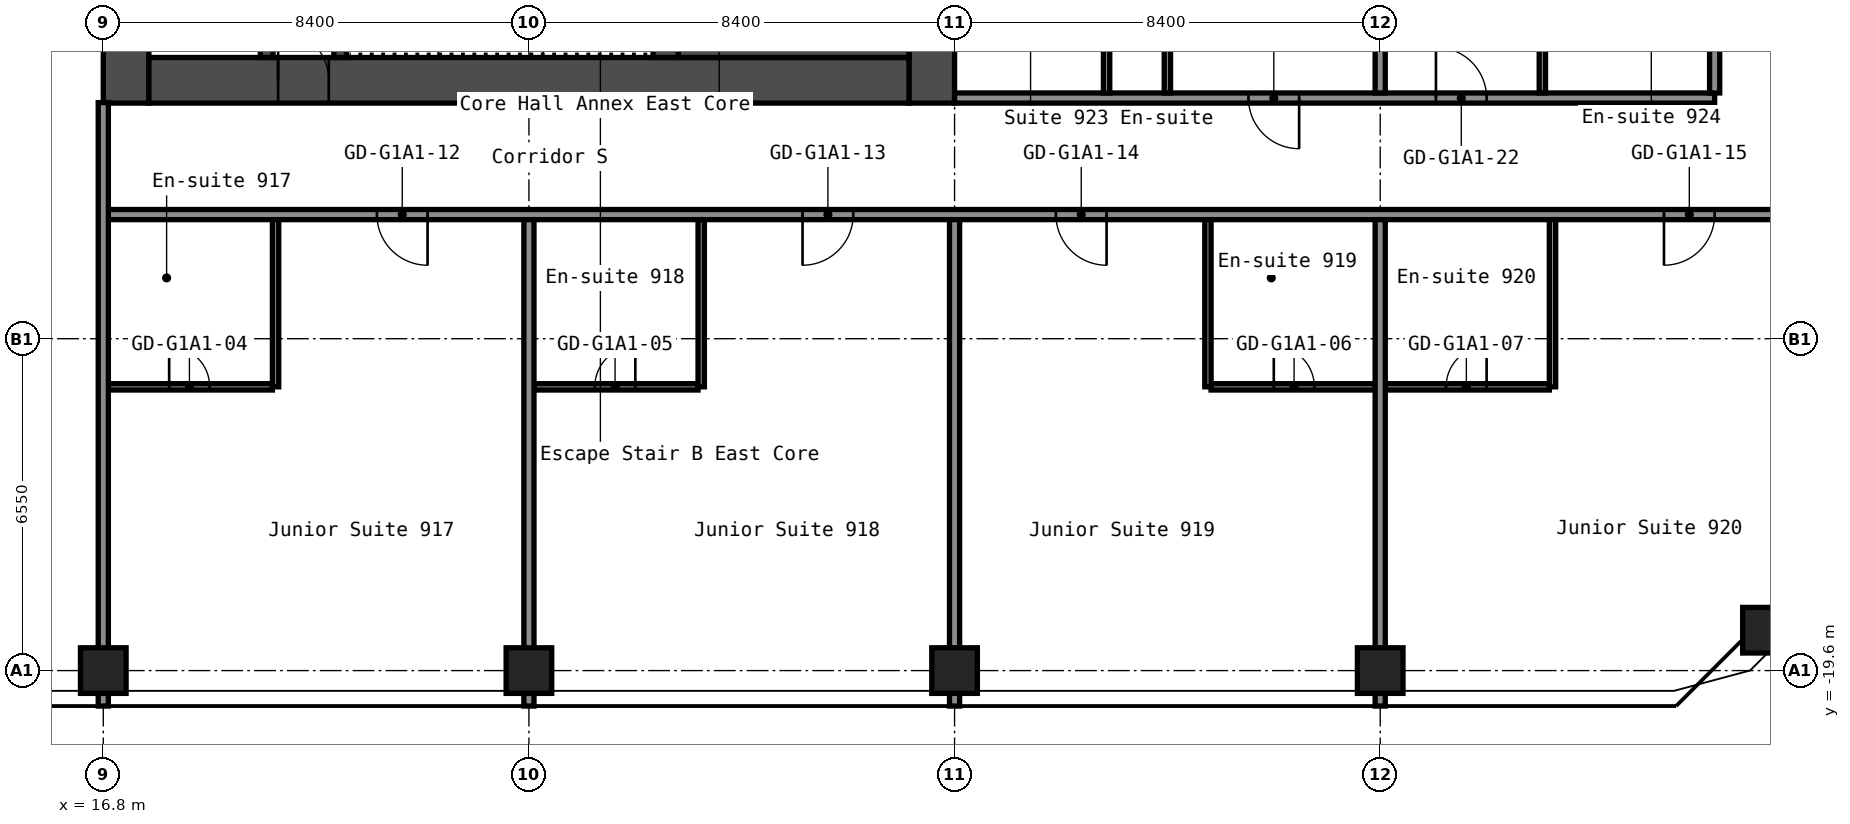
"""IFC4 building model, lengths in metres.
Left out: names, types, materials, properties, quantities, classifications, styles, units other than length and angle.
Written with IfcOpenShell. Run it as: python <this file> out.ifc"""

import sys

from ifc_helpers import new_model, si_unit, direction, frame, frame_2d, origin, origin_2d, place, context, subcontext, project, spatial, rectangle, hollow_rectangle, extrude, element, fill, save


model = new_model("IFC4")
c1 = context("Model", 3, precision=1e-05, world=origin(), true_north=direction((0.0, 1.0)))
c2 = subcontext(c1, "Body", "Model", "MODEL_VIEW")
j1 = project(units=[si_unit("LENGTHUNIT", "METRE"), si_unit("PLANEANGLEUNIT", "RADIAN")], contexts=[c1])
p1 = place(None, origin())
s1 = spatial("IfcSite", under=j1, at=p1, CompositionType="ELEMENT")
p2 = place(p1, origin())
s2 = spatial("IfcBuilding", under=s1, at=p2, CompositionType="ELEMENT")
p3 = place(p2, frame((0.0, 0.0, 35.8)))
s3 = spatial("IfcBuildingStorey", under=s2, at=p3, CompositionType="ELEMENT", Elevation=35.8)
for number, where, z_axis, x_axis in (
    (1, (16.8, -19.6, 0.0), (0.0, 0.0, 1.0), (1.0, 0.0, 0.0)),
    (2, (25.2, -19.6, 0.0), (0.0, 0.0, 1.0), (1.0, 0.0, 0.0)),
    (3, (33.6, -19.6, 0.0), (0.0, 0.0, 1.0), (1.0, 0.0, 0.0)),
    (4, (42.0, -19.6, 0.0), (0.0, 0.0, 1.0), (1.0, 0.0, 0.0)),
    (5, (49.603, -18.803, 0.0), (0.0, 0.0, 1.0), (1.0, 0.0, 0.0)),
):
    element("IfcColumn", number, at=place(p3, frame(where, z_axis=z_axis, x_axis=x_axis)), inside=s3, PredefinedType="COLUMN", context=c2, shape_type="SweptSolid", body=[
        extrude(hollow_rectangle(XDim=0.9, YDim=0.9, WallThickness=0.036, at=origin_2d()), origin(), (0.0, 0.0, 1.0), 2.8),
    ])
p4 = place(p3, frame((17.25, -8.4, 0.0), z_axis=(0.0, 0.0, 1.0), x_axis=(0.0, 1.0, 0.0)))
e6 = element("IfcWall", 6, at=p4, inside=s3, PredefinedType="SHEAR", context=c2, shape_type="SweptSolid", body=[
    extrude(rectangle(XDim=16.8, YDim=0.9, at=frame_2d((8.4, 0.0))), origin(), (0.0, 0.0, 1.0), 2.8),
])
p5 = place(p4, frame((12.75, 0.0, 0.0)))
e7 = element("IfcOpeningElement", 7, at=p5, cuts=e6, PredefinedType="OPENING", context=c2, shape_type="SweptSolid", body=[
    extrude(rectangle(XDim=1.2, YDim=2.1, at=frame_2d((0.6, 1.05))), frame((0.0, 0.46, 0.0), z_axis=(0.0, -1.0, 0.0), x_axis=(1.0, 0.0, 0.0)), (0.0, 0.0, 1.0), 0.92),
])
p6 = place(p4, frame((2.85, 0.0, 0.0)))
e8 = element("IfcOpeningElement", 8, at=p6, cuts=e6, PredefinedType="OPENING", context=c2, shape_type="SweptSolid", body=[
    extrude(rectangle(XDim=1.2, YDim=2.1, at=frame_2d((0.6, 1.05))), frame((0.0, 0.46, 0.0), z_axis=(0.0, -1.0, 0.0), x_axis=(1.0, 0.0, 0.0)), (0.0, 0.0, 1.0), 0.92),
])
p7 = place(p3, frame((33.15, -8.4, 0.0), z_axis=(0.0, 0.0, 1.0), x_axis=(0.0, 1.0, 0.0)))
e9 = element("IfcWall", 9, at=p7, inside=s3, PredefinedType="SHEAR", context=c2, shape_type="SweptSolid", body=[
    extrude(rectangle(XDim=16.8, YDim=0.9, at=frame_2d((8.4, 0.0))), origin(), (0.0, 0.0, 1.0), 2.8),
])
p8 = place(p3, frame((17.7, -7.95, 0.0), z_axis=(0.0, 0.0, 1.0), x_axis=(1.0, 0.0, 0.0)))
e10 = element("IfcWall", 10, at=p8, inside=s3, PredefinedType="SHEAR", context=c2, shape_type="SweptSolid", body=[
    extrude(rectangle(XDim=15.0, YDim=0.9, at=frame_2d((7.5, 0.0))), origin(), (0.0, 0.0, 1.0), 2.8),
])
p9 = place(p8, frame((2.55, 0.0, 0.0)))
e11 = element("IfcOpeningElement", 11, at=p9, cuts=e10, PredefinedType="OPENING", context=c2, shape_type="SweptSolid", body=[
    extrude(rectangle(XDim=1.0, YDim=2.1, at=frame_2d((0.5, 1.05))), frame((0.0, 0.46, 0.0), z_axis=(0.0, -1.0, 0.0), x_axis=(1.0, 0.0, 0.0)), (0.0, 0.0, 1.0), 0.92),
])
p10 = place(p3, frame((20.025, -7.5, 0.0), z_axis=(0.0, 0.0, 1.0), x_axis=(0.0, 1.0, 0.0)))
e12 = element("IfcWall", 12, at=p10, inside=s3, PredefinedType="SHEAR", context=c2, shape_type="SweptSolid", body=[
    extrude(rectangle(XDim=6.3, YDim=0.25, at=frame_2d((3.15, 0.0))), origin(), (0.0, 0.0, 1.0), 2.8),
])
p11 = place(p10, frame((2.4, 0.0, 0.0)))
e13 = element("IfcOpeningElement", 13, at=p11, cuts=e12, PredefinedType="OPENING", context=c2, shape_type="SweptSolid", body=[
    extrude(rectangle(XDim=1.0, YDim=2.1, at=frame_2d((0.5, 1.05))), frame((0.0, 0.135, 0.0), z_axis=(0.0, -1.0, 0.0), x_axis=(1.0, 0.0, 0.0)), (0.0, 0.0, 1.0), 0.27),
])
p12 = place(p3, frame((21.475, -7.5, 0.0), z_axis=(0.0, 0.0, 1.0), x_axis=(0.0, 1.0, 0.0)))
e14 = element("IfcWall", 14, at=p12, inside=s3, PredefinedType="SHEAR", context=c2, shape_type="SweptSolid", body=[
    extrude(rectangle(XDim=3.75, YDim=0.25, at=frame_2d((1.875, 0.0))), origin(), (0.0, 0.0, 1.0), 2.8),
])
p13 = place(p12, frame((1.3, 0.0, 0.0)))
e15 = element("IfcOpeningElement", 15, at=p13, cuts=e14, PredefinedType="OPENING", context=c2, shape_type="SweptSolid", body=[
    extrude(rectangle(XDim=1.2, YDim=2.1, at=frame_2d((0.6, 1.05))), frame((0.0, 0.135, 0.0), z_axis=(0.0, -1.0, 0.0), x_axis=(1.0, 0.0, 0.0)), (0.0, 0.0, 1.0), 0.27),
])
p14 = place(p3, frame((27.9, -7.5, 0.0), z_axis=(0.0, 0.0, 1.0), x_axis=(0.0, 1.0, 0.0)))
e16 = element("IfcWall", 16, at=p14, inside=s3, PredefinedType="SHEAR", context=c2, shape_type="SweptSolid", body=[
    extrude(rectangle(XDim=3.75, YDim=0.5, at=frame_2d((1.875, 0.0))), origin(), (0.0, 0.0, 1.0), 2.8),
])
p15 = place(p3, frame((28.15, -6.75, 0.0), z_axis=(0.0, 0.0, 1.0), x_axis=(1.0, 0.0, 0.0)))
e17 = element("IfcWall", 17, at=p15, inside=s3, PredefinedType="SHEAR", context=c2, shape_type="SweptSolid", body=[
    extrude(rectangle(XDim=4.55, YDim=1.5, at=frame_2d((2.275, 0.0))), origin(), (0.0, 0.0, 1.0), 2.8),
])
p16 = place(p3, frame((16.9, -14.0, 0.0), z_axis=(0.0, 0.0, 1.0), x_axis=(1.0, 0.0, 0.0)))
e18 = element("IfcWall", 18, at=p16, inside=s3, PredefinedType="PARTITIONING", context=c2, shape_type="SweptSolid", body=[
    extrude(rectangle(XDim=3.238, YDim=0.125, at=frame_2d((1.619, 0.0))), origin(), (0.0, 0.0, 1.0), 2.8),
])
p17 = place(p16, frame((1.2, 0.0, 0.0)))
e19 = element("IfcOpeningElement", 19, at=p17, cuts=e18, PredefinedType="OPENING", context=c2, shape_type="SweptSolid", body=[
    extrude(rectangle(XDim=0.8, YDim=2.1, at=frame_2d((0.4, 1.05))), frame((0.0, 0.073, 0.0), z_axis=(0.0, -1.0, 0.0), x_axis=(1.0, 0.0, 0.0)), (0.0, 0.0, 1.0), 0.145),
])
p18 = place(p3, frame((25.3, -14.0, 0.0), z_axis=(0.0, 0.0, 1.0), x_axis=(1.0, 0.0, 0.0)))
e20 = element("IfcWall", 20, at=p18, inside=s3, PredefinedType="PARTITIONING", context=c2, shape_type="SweptSolid", body=[
    extrude(rectangle(XDim=3.238, YDim=0.125, at=frame_2d((1.619, 0.0))), origin(), (0.0, 0.0, 1.0), 2.8),
])
p19 = place(p18, frame((1.2, 0.0, 0.0)))
e21 = element("IfcOpeningElement", 21, at=p19, cuts=e20, PredefinedType="OPENING", context=c2, shape_type="SweptSolid", body=[
    extrude(rectangle(XDim=0.8, YDim=2.1, at=frame_2d((0.4, 1.05))), frame((0.0, 0.073, 0.0), z_axis=(0.0, -1.0, 0.0), x_axis=(1.0, 0.0, 0.0)), (0.0, 0.0, 1.0), 0.145),
])
p20 = place(p3, frame((38.663, -14.0, 0.0), z_axis=(0.0, 0.0, 1.0), x_axis=(1.0, 0.0, 0.0)))
e22 = element("IfcWall", 22, at=p20, inside=s3, PredefinedType="PARTITIONING", context=c2, shape_type="SweptSolid", body=[
    extrude(rectangle(XDim=6.675, YDim=0.125, at=frame_2d((3.337, 0.0))), origin(), (0.0, 0.0, 1.0), 2.8),
])
p21 = place(p20, frame((1.238, 0.0, 0.0)))
e23 = element("IfcOpeningElement", 23, at=p21, cuts=e22, PredefinedType="OPENING", context=c2, shape_type="SweptSolid", body=[
    extrude(rectangle(XDim=0.8, YDim=2.1, at=frame_2d((0.4, 1.05))), frame((0.0, 0.073, 0.0), z_axis=(0.0, -1.0, 0.0), x_axis=(1.0, 0.0, 0.0)), (0.0, 0.0, 1.0), 0.145),
])
p22 = place(p20, frame((4.637, 0.0, 0.0)))
e24 = element("IfcOpeningElement", 24, at=p22, cuts=e22, PredefinedType="OPENING", context=c2, shape_type="SweptSolid", body=[
    extrude(rectangle(XDim=0.8, YDim=2.1, at=frame_2d((0.4, 1.05))), frame((0.0, 0.073, 0.0), z_axis=(0.0, -1.0, 0.0), x_axis=(1.0, 0.0, 0.0)), (0.0, 0.0, 1.0), 0.145),
])
p23 = place(p3, frame((16.8, -10.6, 0.0), z_axis=(0.0, 0.0, 1.0), x_axis=(1.0, 0.0, 0.0)))
e25 = element("IfcWall", 25, at=p23, inside=s3, PredefinedType="PARTITIONING", context=c2, shape_type="SweptSolid", body=[
    extrude(rectangle(XDim=34.3, YDim=0.2, at=frame_2d((17.15, 0.0))), origin(), (0.0, 0.0, 1.0), 2.8),
])
p24 = place(p23, frame((5.4, 0.0, 0.0)))
e26 = element("IfcOpeningElement", 26, at=p24, cuts=e25, PredefinedType="OPENING", context=c2, shape_type="SweptSolid", body=[
    extrude(rectangle(XDim=1.0, YDim=2.1, at=frame_2d((0.5, 1.05))), frame((0.0, 0.11, 0.0), z_axis=(0.0, -1.0, 0.0), x_axis=(1.0, 0.0, 0.0)), (0.0, 0.0, 1.0), 0.22),
])
p25 = place(p23, frame((13.8, 0.0, 0.0)))
e27 = element("IfcOpeningElement", 27, at=p25, cuts=e25, PredefinedType="OPENING", context=c2, shape_type="SweptSolid", body=[
    extrude(rectangle(XDim=1.0, YDim=2.1, at=frame_2d((0.5, 1.05))), frame((0.0, 0.11, 0.0), z_axis=(0.0, -1.0, 0.0), x_axis=(1.0, 0.0, 0.0)), (0.0, 0.0, 1.0), 0.22),
])
p26 = place(p23, frame((18.8, 0.0, 0.0)))
e28 = element("IfcOpeningElement", 28, at=p26, cuts=e25, PredefinedType="OPENING", context=c2, shape_type="SweptSolid", body=[
    extrude(rectangle(XDim=1.0, YDim=2.1, at=frame_2d((0.5, 1.05))), frame((0.0, 0.11, 0.0), z_axis=(0.0, -1.0, 0.0), x_axis=(1.0, 0.0, 0.0)), (0.0, 0.0, 1.0), 0.22),
])
p27 = place(p23, frame((30.8, 0.0, 0.0)))
e29 = element("IfcOpeningElement", 29, at=p27, cuts=e25, PredefinedType="OPENING", context=c2, shape_type="SweptSolid", body=[
    extrude(rectangle(XDim=1.0, YDim=2.1, at=frame_2d((0.5, 1.05))), frame((0.0, 0.11, 0.0), z_axis=(0.0, -1.0, 0.0), x_axis=(1.0, 0.0, 0.0)), (0.0, 0.0, 1.0), 0.22),
])
p28 = place(p3, frame((33.6, -8.3, 0.0), z_axis=(0.0, 0.0, 1.0), x_axis=(1.0, 0.0, 0.0)))
e30 = element("IfcWall", 30, at=p28, inside=s3, PredefinedType="PARTITIONING", context=c2, shape_type="SweptSolid", body=[
    extrude(rectangle(XDim=15.0, YDim=0.2, at=frame_2d((7.5, 0.0))), origin(), (0.0, 0.0, 1.0), 2.8),
])
p29 = place(p28, frame((5.8, 0.0, 0.0)))
e31 = element("IfcOpeningElement", 31, at=p29, cuts=e30, PredefinedType="OPENING", context=c2, shape_type="SweptSolid", body=[
    extrude(rectangle(XDim=1.0, YDim=2.1, at=frame_2d((0.5, 1.05))), frame((0.0, 0.11, 0.0), z_axis=(0.0, -1.0, 0.0), x_axis=(1.0, 0.0, 0.0)), (0.0, 0.0, 1.0), 0.22),
])
p30 = place(p28, frame((9.5, 0.0, 0.0)))
e32 = element("IfcOpeningElement", 32, at=p30, cuts=e30, PredefinedType="OPENING", context=c2, shape_type="SweptSolid", body=[
    extrude(rectangle(XDim=1.0, YDim=2.1, at=frame_2d((0.5, 1.05))), frame((0.0, 0.11, 0.0), z_axis=(0.0, -1.0, 0.0), x_axis=(1.0, 0.0, 0.0)), (0.0, 0.0, 1.0), 0.22),
])
p31 = place(p3, frame((16.8, -20.3, 0.0), z_axis=(0.0, 0.0, 1.0), x_axis=(0.0, 1.0, 0.0)))
e33 = element("IfcWall", 33, at=p31, inside=s3, PredefinedType="PARTITIONING", context=c2, shape_type="SweptSolid", body=[
    extrude(rectangle(XDim=11.91, YDim=0.2, at=frame_2d((5.955, 0.0))), origin(), (0.0, 0.0, 1.0), 2.8),
])
p32 = place(p3, frame((20.2, -14.0, 0.0), z_axis=(0.0, 0.0, 1.0), x_axis=(0.0, 1.0, 0.0)))
e34 = element("IfcWall", 34, at=p32, inside=s3, PredefinedType="PARTITIONING", context=c2, shape_type="SweptSolid", body=[
    extrude(rectangle(XDim=3.3, YDim=0.125, at=frame_2d((1.65, 0.0))), origin(), (0.0, 0.0, 1.0), 2.8),
])
p33 = place(p3, frame((25.2, -20.3, 0.0), z_axis=(0.0, 0.0, 1.0), x_axis=(0.0, 1.0, 0.0)))
e35 = element("IfcWall", 35, at=p33, inside=s3, PredefinedType="PARTITIONING", context=c2, shape_type="SweptSolid", body=[
    extrude(rectangle(XDim=9.6, YDim=0.2, at=frame_2d((4.8, 0.0))), origin(), (0.0, 0.0, 1.0), 2.8),
])
p34 = place(p3, frame((28.6, -14.0, 0.0), z_axis=(0.0, 0.0, 1.0), x_axis=(0.0, 1.0, 0.0)))
e36 = element("IfcWall", 36, at=p34, inside=s3, PredefinedType="PARTITIONING", context=c2, shape_type="SweptSolid", body=[
    extrude(rectangle(XDim=3.3, YDim=0.125, at=frame_2d((1.65, 0.0))), origin(), (0.0, 0.0, 1.0), 2.8),
])
p35 = place(p3, frame((33.6, -20.3, 0.0), z_axis=(0.0, 0.0, 1.0), x_axis=(0.0, 1.0, 0.0)))
e37 = element("IfcWall", 37, at=p35, inside=s3, PredefinedType="PARTITIONING", context=c2, shape_type="SweptSolid", body=[
    extrude(rectangle(XDim=9.6, YDim=0.2, at=frame_2d((4.8, 0.0))), origin(), (0.0, 0.0, 1.0), 2.8),
])
p36 = place(p3, frame((36.6, -8.2, 0.0), z_axis=(0.0, 0.0, 1.0), x_axis=(0.0, 1.0, 0.0)))
e38 = element("IfcWall", 38, at=p36, inside=s3, PredefinedType="PARTITIONING", context=c2, shape_type="SweptSolid", body=[
    extrude(rectangle(XDim=3.1, YDim=0.125, at=frame_2d((1.55, 0.0))), origin(), (0.0, 0.0, 1.0), 2.8),
])
p37 = place(p3, frame((37.8, -8.2, 0.0), z_axis=(0.0, 0.0, 1.0), x_axis=(0.0, 1.0, 0.0)))
e39 = element("IfcWall", 39, at=p37, inside=s3, PredefinedType="PARTITIONING", context=c2, shape_type="SweptSolid", body=[
    extrude(rectangle(XDim=8.1, YDim=0.125, at=frame_2d((4.05, 0.0))), origin(), (0.0, 0.0, 1.0), 2.8),
])
p38 = place(p37, frame((4.05, 0.0, 0.0)))
e40 = element("IfcOpeningElement", 40, at=p38, cuts=e39, PredefinedType="OPENING", context=c2, shape_type="SweptSolid", body=[
    extrude(rectangle(XDim=0.9, YDim=2.1, at=frame_2d((0.45, 1.05))), frame((0.0, 0.073, 0.0), z_axis=(0.0, -1.0, 0.0), x_axis=(1.0, 0.0, 0.0)), (0.0, 0.0, 1.0), 0.145),
])
p39 = place(p3, frame((38.6, -14.0, 0.0), z_axis=(0.0, 0.0, 1.0), x_axis=(0.0, 1.0, 0.0)))
e41 = element("IfcWall", 41, at=p39, inside=s3, PredefinedType="PARTITIONING", context=c2, shape_type="SweptSolid", body=[
    extrude(rectangle(XDim=3.3, YDim=0.125, at=frame_2d((1.65, 0.0))), origin(), (0.0, 0.0, 1.0), 2.8),
])
p40 = place(p3, frame((42.0, -20.3, 0.0), z_axis=(0.0, 0.0, 1.0), x_axis=(0.0, 1.0, 0.0)))
e42 = element("IfcWall", 42, at=p40, inside=s3, PredefinedType="PARTITIONING", context=c2, shape_type="SweptSolid", body=[
    extrude(rectangle(XDim=9.6, YDim=0.2, at=frame_2d((4.8, 0.0))), origin(), (0.0, 0.0, 1.0), 2.8),
])
p41 = place(p3, frame((42.0, -8.2, 0.0), z_axis=(0.0, 0.0, 1.0), x_axis=(0.0, 1.0, 0.0)))
e43 = element("IfcWall", 43, at=p41, inside=s3, PredefinedType="PARTITIONING", context=c2, shape_type="SweptSolid", body=[
    extrude(rectangle(XDim=16.4, YDim=0.2, at=frame_2d((8.2, 0.0))), origin(), (0.0, 0.0, 1.0), 2.8),
])
for number, where, z_axis, x_axis in (
    (44, (45.2, -8.2, 0.0), (0.0, 0.0, 1.0), (0.0, 1.0, 0.0)),
    (45, (45.4, -14.0, 0.0), (0.0, 0.0, 1.0), (0.0, 1.0, 0.0)),
):
    element("IfcWall", number, at=place(p3, frame(where, z_axis=z_axis, x_axis=x_axis)), inside=s3, PredefinedType="PARTITIONING", context=c2, shape_type="SweptSolid", body=[
        extrude(rectangle(XDim=3.3, YDim=0.125, at=frame_2d((1.65, 0.0))), origin(), (0.0, 0.0, 1.0), 2.8),
    ])
p42 = place(p3, frame((48.6, -8.2, 0.0), z_axis=(0.0, 0.0, 1.0), x_axis=(0.0, 1.0, 0.0)))
e46 = element("IfcWall", 46, at=p42, inside=s3, PredefinedType="PARTITIONING", context=c2, shape_type="SweptSolid", body=[
    extrude(rectangle(XDim=16.4, YDim=0.2, at=frame_2d((8.2, 0.0))), origin(), (0.0, 0.0, 1.0), 2.8),
])
p43 = place(p9, origin())
e47 = element("IfcDoor", 47, at=p43, inside=s3, OperationType="SINGLE_SWING_RIGHT", PredefinedType="DOOR", context=c2, shape_type="SweptSolid", body=[
    extrude(rectangle(XDim=1.0, YDim=2.1, at=frame_2d((0.5, 1.05))), frame((0.0, 0.025, 0.0), z_axis=(0.0, -1.0, 0.0), x_axis=(1.0, 0.0, 0.0)), (0.0, 0.0, 1.0), 0.05),
])
fill(e11, e47)
p44 = place(p17, origin())
e48 = element("IfcDoor", 48, at=p44, inside=s3, OperationType="SINGLE_SWING_RIGHT", PredefinedType="DOOR", context=c2, shape_type="SweptSolid", body=[
    extrude(rectangle(XDim=0.8, YDim=2.1, at=frame_2d((0.4, 1.05))), frame((0.0, 0.025, 0.0), z_axis=(0.0, -1.0, 0.0), x_axis=(1.0, 0.0, 0.0)), (0.0, 0.0, 1.0), 0.05),
])
fill(e19, e48)
p45 = place(p19, origin())
e49 = element("IfcDoor", 49, at=p45, inside=s3, OperationType="SINGLE_SWING_LEFT", PredefinedType="DOOR", context=c2, shape_type="SweptSolid", body=[
    extrude(rectangle(XDim=0.8, YDim=2.1, at=frame_2d((0.4, 1.05))), frame((0.0, 0.025, 0.0), z_axis=(0.0, -1.0, 0.0), x_axis=(1.0, 0.0, 0.0)), (0.0, 0.0, 1.0), 0.05),
])
fill(e21, e49)
p46 = place(p21, origin())
e50 = element("IfcDoor", 50, at=p46, inside=s3, OperationType="SINGLE_SWING_RIGHT", PredefinedType="DOOR", context=c2, shape_type="SweptSolid", body=[
    extrude(rectangle(XDim=0.8, YDim=2.1, at=frame_2d((0.4, 1.05))), frame((0.0, 0.025, 0.0), z_axis=(0.0, -1.0, 0.0), x_axis=(1.0, 0.0, 0.0)), (0.0, 0.0, 1.0), 0.05),
])
fill(e23, e50)
p47 = place(p22, origin())
e51 = element("IfcDoor", 51, at=p47, inside=s3, OperationType="SINGLE_SWING_LEFT", PredefinedType="DOOR", context=c2, shape_type="SweptSolid", body=[
    extrude(rectangle(XDim=0.8, YDim=2.1, at=frame_2d((0.4, 1.05))), frame((0.0, 0.025, 0.0), z_axis=(0.0, -1.0, 0.0), x_axis=(1.0, 0.0, 0.0)), (0.0, 0.0, 1.0), 0.05),
])
fill(e24, e51)
p48 = place(p24, origin())
e52 = element("IfcDoor", 52, at=p48, inside=s3, OperationType="SINGLE_SWING_RIGHT", PredefinedType="DOOR", context=c2, shape_type="SweptSolid", body=[
    extrude(rectangle(XDim=1.0, YDim=2.1, at=frame_2d((0.5, 1.05))), frame((0.0, 0.025, 0.0), z_axis=(0.0, -1.0, 0.0), x_axis=(1.0, 0.0, 0.0)), (0.0, 0.0, 1.0), 0.05),
])
fill(e26, e52)
p49 = place(p25, origin())
e53 = element("IfcDoor", 53, at=p49, inside=s3, OperationType="SINGLE_SWING_LEFT", PredefinedType="DOOR", context=c2, shape_type="SweptSolid", body=[
    extrude(rectangle(XDim=1.0, YDim=2.1, at=frame_2d((0.5, 1.05))), frame((0.0, 0.025, 0.0), z_axis=(0.0, -1.0, 0.0), x_axis=(1.0, 0.0, 0.0)), (0.0, 0.0, 1.0), 0.05),
])
fill(e27, e53)
p50 = place(p26, origin())
e54 = element("IfcDoor", 54, at=p50, inside=s3, OperationType="SINGLE_SWING_RIGHT", PredefinedType="DOOR", context=c2, shape_type="SweptSolid", body=[
    extrude(rectangle(XDim=1.0, YDim=2.1, at=frame_2d((0.5, 1.05))), frame((0.0, 0.025, 0.0), z_axis=(0.0, -1.0, 0.0), x_axis=(1.0, 0.0, 0.0)), (0.0, 0.0, 1.0), 0.05),
])
fill(e28, e54)
p51 = place(p27, origin())
e55 = element("IfcDoor", 55, at=p51, inside=s3, OperationType="SINGLE_SWING_LEFT", PredefinedType="DOOR", context=c2, shape_type="SweptSolid", body=[
    extrude(rectangle(XDim=1.0, YDim=2.1, at=frame_2d((0.5, 1.05))), frame((0.0, 0.025, 0.0), z_axis=(0.0, -1.0, 0.0), x_axis=(1.0, 0.0, 0.0)), (0.0, 0.0, 1.0), 0.05),
])
fill(e29, e55)
p52 = place(p29, origin())
e56 = element("IfcDoor", 56, at=p52, inside=s3, OperationType="SINGLE_SWING_RIGHT", PredefinedType="DOOR", context=c2, shape_type="SweptSolid", body=[
    extrude(rectangle(XDim=1.0, YDim=2.1, at=frame_2d((0.5, 1.05))), frame((0.0, 0.025, 0.0), z_axis=(0.0, -1.0, 0.0), x_axis=(1.0, 0.0, 0.0)), (0.0, 0.0, 1.0), 0.05),
])
fill(e31, e56)
p53 = place(p30, origin())
e57 = element("IfcDoor", 57, at=p53, inside=s3, OperationType="SINGLE_SWING_RIGHT", PredefinedType="DOOR", context=c2, shape_type="SweptSolid", body=[
    extrude(rectangle(XDim=1.0, YDim=2.1, at=frame_2d((0.5, 1.05))), frame((0.0, 0.025, 0.0), z_axis=(0.0, -1.0, 0.0), x_axis=(1.0, 0.0, 0.0)), (0.0, 0.0, 1.0), 0.05),
])
fill(e32, e57)
save(model, sys.argv[1])
